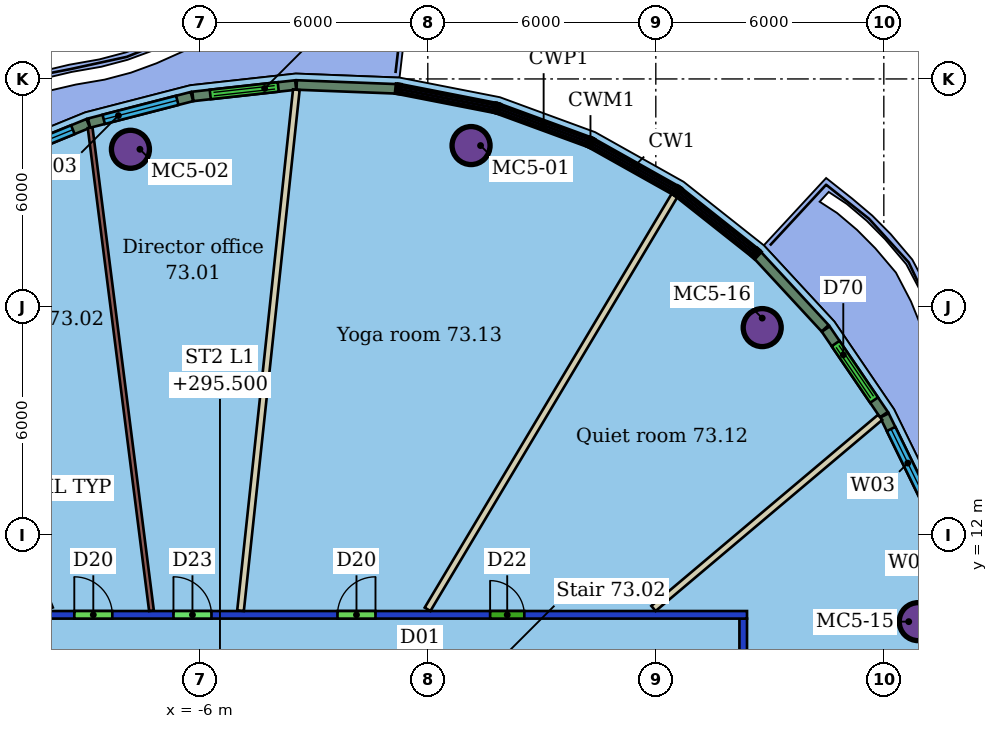
"""IFC4 building model, lengths in metres.
Left out: names, types, materials, properties, quantities, classifications, styles, units other than length and angle.
Written with IfcOpenShell. Run it as: python <this file> out.ifc"""

import sys

from ifc_helpers import new_model, si_unit, direction, frame, frame_2d, origin, origin_2d, place, context, subcontext, project, spatial, rectangle, hollow_circle, extrude, element, fill, save


model = new_model("IFC4")
c1 = context("Model", 3, precision=1e-05, world=origin(), true_north=direction((0.0, 1.0)))
c2 = subcontext(c1, "Body", "Model", "MODEL_VIEW")
j1 = project(units=[si_unit("LENGTHUNIT", "METRE"), si_unit("PLANEANGLEUNIT", "RADIAN")], contexts=[c1])
p1 = place(None, origin())
s1 = spatial("IfcSite", under=j1, at=p1, CompositionType="ELEMENT")
p2 = place(p1, origin())
s2 = spatial("IfcBuilding", under=s1, at=p2, CompositionType="ELEMENT")
p3 = place(p2, frame((0.0, 0.0, 293.7)))
s3 = spatial("IfcBuildingStorey", under=s2, at=p3, CompositionType="ELEMENT", Elevation=293.7)
for number, where, z_axis, x_axis in (
    (1, (1.138, 22.247, 0.0), (0.0, 0.0, 1.0), (1.0, 0.0, 0.0)),
    (2, (-7.825, 22.149, 0.0), (0.0, 0.0, 1.0), (1.0, 0.0, 0.0)),
    (3, (12.906, 9.72, 0.0), (0.0, 0.0, 1.0), (1.0, 0.0, 0.0)),
    (4, (8.8, 17.457, 0.0), (0.0, 0.0, 1.0), (1.0, 0.0, 0.0)),
):
    element("IfcColumn", number, at=place(p3, frame(where, z_axis=z_axis, x_axis=x_axis)), inside=s3, PredefinedType="COLUMN", context=c2, shape_type="SweptSolid", body=[
        extrude(hollow_circle(Radius=0.5, WallThickness=0.04, at=origin_2d()), origin(), (0.0, 0.0, 1.0), 3.45),
    ])
p4 = place(p3, frame((-20.4, 9.9, 0.0), z_axis=(0.0, 0.0, 1.0), x_axis=(1.0, 0.0, 0.0)))
e5 = element("IfcWall", 5, at=p4, inside=s3, PredefinedType="PARTITIONING", context=c2, shape_type="SweptSolid", body=[
    extrude(rectangle(XDim=28.8, YDim=0.2, at=frame_2d((14.4, 0.0))), origin(), (0.0, 0.0, 1.0), 3.1),
])
p5 = place(p4, frame((13.707, 0.0, 0.0)))
e6 = element("IfcOpeningElement", 6, at=p5, cuts=e5, PredefinedType="OPENING", context=c2, shape_type="SweptSolid", body=[
    extrude(rectangle(XDim=1.0, YDim=2.4, at=frame_2d((0.5, 1.2))), frame((0.0, 0.11, 0.0), z_axis=(0.0, -1.0, 0.0), x_axis=(1.0, 0.0, 0.0)), (0.0, 0.0, 1.0), 0.22),
])
p6 = place(p4, frame((11.098, 0.0, 0.0)))
e7 = element("IfcOpeningElement", 7, at=p6, cuts=e5, PredefinedType="OPENING", context=c2, shape_type="SweptSolid", body=[
    extrude(rectangle(XDim=1.0, YDim=2.1, at=frame_2d((0.5, 1.05))), frame((0.0, 0.11, 0.0), z_axis=(0.0, -1.0, 0.0), x_axis=(1.0, 0.0, 0.0)), (0.0, 0.0, 1.0), 0.22),
])
p7 = place(p4, frame((5.799, 0.0, 0.0)))
e8 = element("IfcOpeningElement", 8, at=p7, cuts=e5, PredefinedType="OPENING", context=c2, shape_type="SweptSolid", body=[
    extrude(rectangle(XDim=1.8, YDim=2.4, at=frame_2d((0.9, 1.2))), frame((0.0, 0.11, 0.0), z_axis=(0.0, -1.0, 0.0), x_axis=(1.0, 0.0, 0.0)), (0.0, 0.0, 1.0), 0.22),
])
p8 = place(p4, frame((22.04, 0.0, 0.0)))
e9 = element("IfcOpeningElement", 9, at=p8, cuts=e5, PredefinedType="OPENING", context=c2, shape_type="SweptSolid", body=[
    extrude(rectangle(XDim=0.9, YDim=2.1, at=frame_2d((0.45, 1.05))), frame((0.0, 0.11, 0.0), z_axis=(0.0, -1.0, 0.0), x_axis=(1.0, 0.0, 0.0)), (0.0, 0.0, 1.0), 0.22),
])
p9 = place(p4, frame((18.023, 0.0, 0.0)))
e10 = element("IfcOpeningElement", 10, at=p9, cuts=e5, PredefinedType="OPENING", context=c2, shape_type="SweptSolid", body=[
    extrude(rectangle(XDim=1.0, YDim=2.1, at=frame_2d((0.5, 1.05))), frame((0.0, 0.11, 0.0), z_axis=(0.0, -1.0, 0.0), x_axis=(1.0, 0.0, 0.0)), (0.0, 0.0, 1.0), 0.22),
])
p10 = place(p3, frame((8.3, 9.8, 0.0), z_axis=(0.0, 0.0, 1.0), x_axis=(0.0, -1.0, 0.0)))
e11 = element("IfcWall", 11, at=p10, inside=s3, PredefinedType="PARTITIONING", context=c2, shape_type="SweptSolid", body=[
    extrude(rectangle(XDim=19.6, YDim=0.2, at=frame_2d((9.8, 0.0))), origin(), (0.0, 0.0, 1.0), 3.1),
])
p11 = place(p10, frame((8.302, 0.0, 0.0)))
e12 = element("IfcOpeningElement", 12, at=p11, cuts=e11, PredefinedType="OPENING", context=c2, shape_type="SweptSolid", body=[
    extrude(rectangle(XDim=0.9, YDim=2.1, at=frame_2d((0.45, 1.05))), frame((0.0, 0.11, 0.0), z_axis=(0.0, -1.0, 0.0), x_axis=(1.0, 0.0, 0.0)), (0.0, 0.0, 1.0), 0.22),
])
p12 = place(p10, frame((3.681, 0.0, 0.0)))
e13 = element("IfcOpeningElement", 13, at=p12, cuts=e11, PredefinedType="OPENING", context=c2, shape_type="SweptSolid", body=[
    extrude(rectangle(XDim=1.5, YDim=2.4, at=frame_2d((0.75, 1.2))), frame((0.0, 0.11, 0.0), z_axis=(0.0, -1.0, 0.0), x_axis=(1.0, 0.0, 0.0)), (0.0, 0.0, 1.0), 0.22),
])
p13 = place(p3, frame((-3.459, 23.717, 0.0), z_axis=(0.0, 0.0, 1.0), x_axis=(-0.10651999257, -0.994310560732, 0.0)))
e14 = element("IfcWall", 14, at=p13, inside=s3, PredefinedType="PARTITIONING", context=c2, shape_type="SweptSolid", body=[
    extrude(rectangle(XDim=13.786, YDim=0.175, at=frame_2d((6.893, 0.0))), origin(), (0.0, 0.0, 1.0), 3.45),
])
p14 = place(p3, frame((-8.885, 22.716, 0.0), z_axis=(0.0, 0.0, 1.0), x_axis=(0.125993078933, -0.99203112051, 0.0)))
e15 = element("IfcWall", 15, at=p14, inside=s3, PredefinedType="PARTITIONING", context=c2, shape_type="SweptSolid", body=[
    extrude(rectangle(XDim=12.81, YDim=0.125, at=frame_2d((6.405, 0.0))), origin(), (0.0, 0.0, 1.0), 3.45),
])
p15 = place(p3, frame((11.902, 15.095, 0.0), z_axis=(0.0, 0.0, 1.0), x_axis=(-0.764496313842, -0.644628099079, 0.0)))
e16 = element("IfcWall", 16, at=p15, inside=s3, PredefinedType="PARTITIONING", context=c2, shape_type="SweptSolid", body=[
    extrude(rectangle(XDim=7.801, YDim=0.175, at=frame_2d((3.9, 0.0))), origin(), (0.0, 0.0, 1.0), 3.45),
])
p16 = place(p3, frame((6.496, 20.94, 0.0), z_axis=(0.0, 0.0, 1.0), x_axis=(-0.512439887576, -0.858723099503, 0.0)))
e17 = element("IfcWall", 17, at=p16, inside=s3, PredefinedType="PARTITIONING", context=c2, shape_type="SweptSolid", body=[
    extrude(rectangle(XDim=12.688, YDim=0.175, at=frame_2d((6.344, 0.0))), origin(), (0.0, 0.0, 1.0), 3.45),
])
p17 = place(p3, frame((-0.833, 23.74, 0.0), z_axis=(0.0, 0.0, 1.0), x_axis=(-0.999251644624, 0.038680107501, 0.0)))
e18 = element("IfcWall", 18, at=p17, inside=s3, PredefinedType="SOLIDWALL", context=c2, shape_type="SweptSolid", body=[
    extrude(rectangle(XDim=2.619, YDim=0.25, at=frame_2d((1.31, 0.0))), origin(), (0.0, 0.0, 1.0), 3.15),
])
p18 = place(p3, frame((-3.477, 23.84, 0.0), z_axis=(0.0, 0.0, 1.0), x_axis=(-0.993924144264, -0.110067231499, 0.0)))
e19 = element("IfcWall", 19, at=p18, inside=s3, PredefinedType="SOLIDWALL", context=c2, shape_type="SweptSolid", body=[
    extrude(rectangle(XDim=2.722, YDim=0.25, at=frame_2d((1.361, 0.0))), origin(), (0.0, 0.0, 1.0), 3.15),
])
p19 = place(p18, frame((0.461, 0.0, 0.0)))
e20 = element("IfcOpeningElement", 20, at=p19, cuts=e19, PredefinedType="OPENING", context=c2, shape_type="SweptSolid", body=[
    extrude(rectangle(XDim=1.8, YDim=2.4, at=frame_2d((0.9, 1.2))), frame((0.0, 0.135, 0.0), z_axis=(0.0, -1.0, 0.0), x_axis=(1.0, 0.0, 0.0)), (0.0, 0.0, 1.0), 0.27),
])
p20 = place(p3, frame((-6.207, 23.536, 0.0), z_axis=(0.0, 0.0, 1.0), x_axis=(-0.968247991757, -0.249991652777, 0.0)))
e21 = element("IfcWall", 21, at=p20, inside=s3, PredefinedType="SOLIDWALL", context=c2, shape_type="SweptSolid", body=[
    extrude(rectangle(XDim=2.794, YDim=0.25, at=frame_2d((1.397, 0.0))), origin(), (0.0, 0.0, 1.0), 3.15),
])
p21 = place(p20, frame((0.397, 0.0, 0.9)))
e22 = element("IfcOpeningElement", 22, at=p21, cuts=e21, PredefinedType="OPENING", context=c2, shape_type="SweptSolid", body=[
    extrude(rectangle(XDim=2.0, YDim=2.1, at=frame_2d((1.0, 1.05))), frame((0.0, 0.135, 0.0), z_axis=(0.0, -1.0, 0.0), x_axis=(1.0, 0.0, 0.0)), (0.0, 0.0, 1.0), 0.27),
])
p22 = place(p3, frame((-8.936, 22.83, 0.0), z_axis=(0.0, 0.0, 1.0), x_axis=(-0.925732306154, -0.378179451243, 0.0)))
e23 = element("IfcWall", 23, at=p22, inside=s3, PredefinedType="SOLIDWALL", context=c2, shape_type="SweptSolid", body=[
    extrude(rectangle(XDim=2.873, YDim=0.25, at=frame_2d((1.437, 0.0))), origin(), (0.0, 0.0, 1.0), 3.15),
])
p23 = place(p22, frame((0.436, 0.0, 0.9)))
e24 = element("IfcOpeningElement", 24, at=p23, cuts=e23, PredefinedType="OPENING", context=c2, shape_type="SweptSolid", body=[
    extrude(rectangle(XDim=2.0, YDim=2.1, at=frame_2d((1.0, 1.05))), frame((0.0, 0.135, 0.0), z_axis=(0.0, -1.0, 0.0), x_axis=(1.0, 0.0, 0.0)), (0.0, 0.0, 1.0), 0.27),
])
p24 = place(p3, frame((13.244, 12.637, 0.0), z_axis=(0.0, 0.0, 1.0), x_axis=(-0.439683351092, 0.898152854904, 0.0)))
e25 = element("IfcWall", 25, at=p24, inside=s3, PredefinedType="SOLIDWALL", context=c2, shape_type="SweptSolid", body=[
    extrude(rectangle(XDim=2.794, YDim=0.25, at=frame_2d((1.397, 0.0))), origin(), (0.0, 0.0, 1.0), 3.15),
])
p25 = place(p24, frame((0.397, 0.0, 0.9)))
e26 = element("IfcOpeningElement", 26, at=p25, cuts=e25, PredefinedType="OPENING", context=c2, shape_type="SweptSolid", body=[
    extrude(rectangle(XDim=2.0, YDim=2.1, at=frame_2d((1.0, 1.05))), frame((0.0, 0.135, 0.0), z_axis=(0.0, -1.0, 0.0), x_axis=(1.0, 0.0, 0.0)), (0.0, 0.0, 1.0), 0.27),
])
p26 = place(p3, frame((12.003, 15.169, 0.0), z_axis=(0.0, 0.0, 1.0), x_axis=(-0.562624043307, 0.826712879961, 0.0)))
e27 = element("IfcWall", 27, at=p26, inside=s3, PredefinedType="SOLIDWALL", context=c2, shape_type="SweptSolid", body=[
    extrude(rectangle(XDim=2.722, YDim=0.25, at=frame_2d((1.361, 0.0))), origin(), (0.0, 0.0, 1.0), 3.15),
])
p27 = place(p26, frame((0.461, 0.0, 0.0)))
e28 = element("IfcOpeningElement", 28, at=p27, cuts=e27, PredefinedType="OPENING", context=c2, shape_type="SweptSolid", body=[
    extrude(rectangle(XDim=1.8, YDim=2.4, at=frame_2d((0.9, 1.2))), frame((0.0, 0.135, 0.0), z_axis=(0.0, -1.0, 0.0), x_axis=(1.0, 0.0, 0.0)), (0.0, 0.0, 1.0), 0.27),
])
p28 = place(p3, frame((10.455, 17.44, 0.0), z_axis=(0.0, 0.0, 1.0), x_axis=(-0.679173817971, 0.733977468989, 0.0)))
e29 = element("IfcWall", 29, at=p28, inside=s3, PredefinedType="SOLIDWALL", context=c2, shape_type="SweptSolid", body=[
    extrude(rectangle(XDim=2.619, YDim=0.25, at=frame_2d((1.31, 0.0))), origin(), (0.0, 0.0, 1.0), 3.15),
])
p29 = place(p5, origin())
e30 = element("IfcDoor", 30, at=p29, inside=s3, OperationType="SINGLE_SWING_LEFT", PredefinedType="DOOR", context=c2, shape_type="SweptSolid", body=[
    extrude(rectangle(XDim=1.0, YDim=2.4, at=frame_2d((0.5, 1.2))), frame((0.0, 0.025, 0.0), z_axis=(0.0, -1.0, 0.0), x_axis=(1.0, 0.0, 0.0)), (0.0, 0.0, 1.0), 0.05),
])
fill(e6, e30)
p30 = place(p6, origin())
e31 = element("IfcDoor", 31, at=p30, inside=s3, OperationType="SINGLE_SWING_LEFT", PredefinedType="DOOR", context=c2, shape_type="SweptSolid", body=[
    extrude(rectangle(XDim=1.0, YDim=2.1, at=frame_2d((0.5, 1.05))), frame((0.0, 0.025, 0.0), z_axis=(0.0, -1.0, 0.0), x_axis=(1.0, 0.0, 0.0)), (0.0, 0.0, 1.0), 0.05),
])
fill(e7, e31)
p31 = place(p8, origin())
e32 = element("IfcDoor", 32, at=p31, inside=s3, OperationType="SINGLE_SWING_LEFT", PredefinedType="DOOR", context=c2, shape_type="SweptSolid", body=[
    extrude(rectangle(XDim=0.9, YDim=2.1, at=frame_2d((0.45, 1.05))), frame((0.0, 0.025, 0.0), z_axis=(0.0, -1.0, 0.0), x_axis=(1.0, 0.0, 0.0)), (0.0, 0.0, 1.0), 0.05),
])
fill(e9, e32)
p32 = place(p9, origin())
e33 = element("IfcDoor", 33, at=p32, inside=s3, OperationType="SINGLE_SWING_RIGHT", PredefinedType="DOOR", context=c2, shape_type="SweptSolid", body=[
    extrude(rectangle(XDim=1.0, YDim=2.1, at=frame_2d((0.5, 1.05))), frame((0.0, 0.025, 0.0), z_axis=(0.0, -1.0, 0.0), x_axis=(1.0, 0.0, 0.0)), (0.0, 0.0, 1.0), 0.05),
])
fill(e10, e33)
p33 = place(p19, origin())
e34 = element("IfcDoor", 34, at=p33, inside=s3, OperationType="DOUBLE_DOOR_SLIDING", PredefinedType="DOOR", context=c2, shape_type="SweptSolid", body=[
    extrude(rectangle(XDim=1.8, YDim=2.4, at=frame_2d((0.9, 1.2))), frame((0.0, 0.025, 0.0), z_axis=(0.0, -1.0, 0.0), x_axis=(1.0, 0.0, 0.0)), (0.0, 0.0, 1.0), 0.05),
])
fill(e20, e34)
p34 = place(p21, origin())
e35 = element("IfcWindow", 35, at=p34, inside=s3, PartitioningType="SINGLE_PANEL", PredefinedType="WINDOW", context=c2, shape_type="SweptSolid", body=[
    extrude(rectangle(XDim=2.0, YDim=2.1, at=frame_2d((1.0, 1.05))), frame((0.0, 0.03, 0.0), z_axis=(0.0, -1.0, 0.0), x_axis=(1.0, 0.0, 0.0)), (0.0, 0.0, 1.0), 0.06),
])
fill(e22, e35)
p35 = place(p23, origin())
e36 = element("IfcWindow", 36, at=p35, inside=s3, PartitioningType="SINGLE_PANEL", PredefinedType="WINDOW", context=c2, shape_type="SweptSolid", body=[
    extrude(rectangle(XDim=2.0, YDim=2.1, at=frame_2d((1.0, 1.05))), frame((0.0, 0.03, 0.0), z_axis=(0.0, -1.0, 0.0), x_axis=(1.0, 0.0, 0.0)), (0.0, 0.0, 1.0), 0.06),
])
fill(e24, e36)
p36 = place(p25, origin())
e37 = element("IfcWindow", 37, at=p36, inside=s3, PartitioningType="SINGLE_PANEL", PredefinedType="WINDOW", context=c2, shape_type="SweptSolid", body=[
    extrude(rectangle(XDim=2.0, YDim=2.1, at=frame_2d((1.0, 1.05))), frame((0.0, 0.03, 0.0), z_axis=(0.0, -1.0, 0.0), x_axis=(1.0, 0.0, 0.0)), (0.0, 0.0, 1.0), 0.06),
])
fill(e26, e37)
p37 = place(p27, origin())
e38 = element("IfcDoor", 38, at=p37, inside=s3, OperationType="DOUBLE_DOOR_SLIDING", PredefinedType="DOOR", context=c2, shape_type="SweptSolid", body=[
    extrude(rectangle(XDim=1.8, YDim=2.4, at=frame_2d((0.9, 1.2))), frame((0.0, 0.025, 0.0), z_axis=(0.0, -1.0, 0.0), x_axis=(1.0, 0.0, 0.0)), (0.0, 0.0, 1.0), 0.05),
])
fill(e28, e38)
save(model, sys.argv[1])
